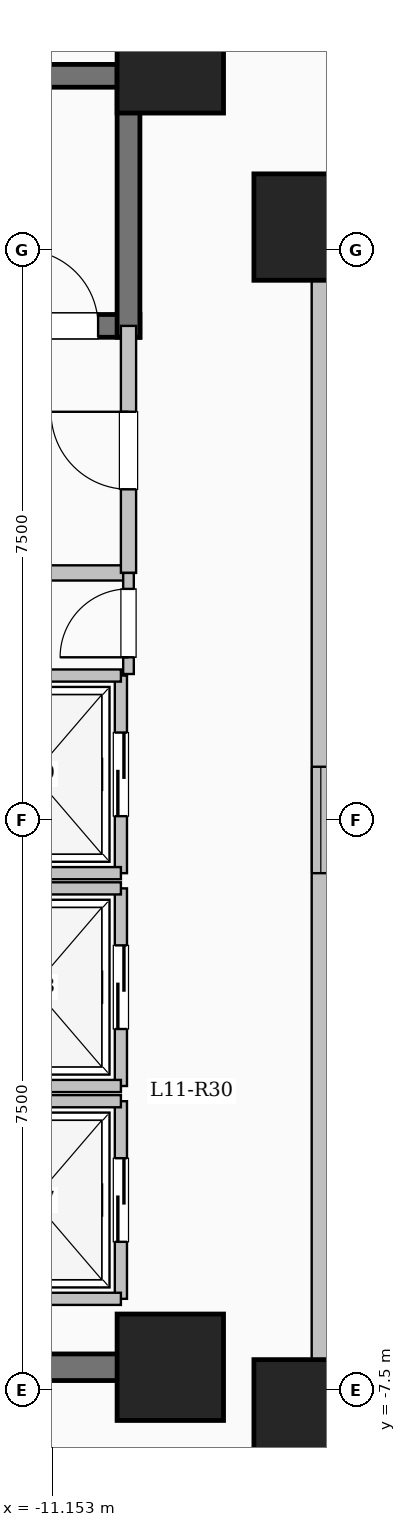
"""IFC4 building model, lengths in metres.
Left out: names, types, materials, properties, quantities, classifications, styles, units other than length and angle.
Written with IfcOpenShell. Run it as: python <this file> out.ifc"""

import sys

from ifc_helpers import new_model, si_unit, direction, frame, frame_2d, origin, origin_2d, place, context, subcontext, project, spatial, rectangle, extrude, element, fill, save


model = new_model("IFC4")
c1 = context("Model", 3, precision=1e-05, world=origin(), true_north=direction((0.0, 1.0)))
c2 = subcontext(c1, "Body", "Model", "MODEL_VIEW")
j1 = project(units=[si_unit("LENGTHUNIT", "METRE"), si_unit("PLANEANGLEUNIT", "RADIAN")], contexts=[c1])
p1 = place(None, origin())
s1 = spatial("IfcSite", under=j1, at=p1, CompositionType="ELEMENT")
p2 = place(p1, origin())
s2 = spatial("IfcBuilding", under=s1, at=p2, CompositionType="ELEMENT")
p3 = place(p2, frame((0.0, 0.0, 44.1)))
s3 = spatial("IfcBuildingStorey", under=s2, at=p3, CompositionType="ELEMENT", Elevation=44.1)
for number, where, z_axis, x_axis in (
    (1, (-7.8, -7.8, 0.0), (0.0, 0.0, 1.0), (1.0, 0.0, 0.0)),
    (2, (-7.8, 7.8, 0.0), (0.0, 0.0, 1.0), (1.0, 0.0, 0.0)),
    (3, (-9.6, -7.2, 0.0), (0.0, 0.0, 1.0), (1.0, 0.0, 0.0)),
    (4, (-9.6, 10.0, 0.0), (0.0, 0.0, 1.0), (1.0, 0.0, 0.0)),
):
    element("IfcColumn", number, at=place(p3, frame(where, z_axis=z_axis, x_axis=x_axis)), inside=s3, PredefinedType="COLUMN", context=c2, shape_type="SweptSolid", body=[
        extrude(rectangle(XDim=1.4, YDim=1.4, at=origin_2d()), origin(), (0.0, 0.0, 1.0), 3.35),
    ])
p4 = place(p3, frame((-7.62, -7.62, 0.0), z_axis=(0.0, 0.0, 1.0), x_axis=(1.0, 0.0, 0.0)))
e5 = element("IfcWall", 5, at=p4, inside=s3, PredefinedType="SOLIDWALL", context=c2, shape_type="SweptSolid", body=[
    extrude(rectangle(XDim=15.24, YDim=0.24, at=frame_2d((7.62, 0.0))), origin(), (0.0, 0.0, 1.0), 3.1),
])
p5 = place(p4, frame((6.92, 0.0, 0.95)))
e6 = element("IfcOpeningElement", 6, at=p5, cuts=e5, PredefinedType="OPENING", context=c2, shape_type="SweptSolid", body=[
    extrude(rectangle(XDim=1.4, YDim=1.5, at=frame_2d((0.7, 0.75))), frame((0.0, 0.13, 0.0), z_axis=(0.0, -1.0, 0.0), x_axis=(1.0, 0.0, 0.0)), (0.0, 0.0, 1.0), 0.26),
])
p6 = place(p3, frame((7.62, 7.62, 0.0), z_axis=(0.0, 0.0, 1.0), x_axis=(-1.0, 0.0, 0.0)))
e7 = element("IfcWall", 7, at=p6, inside=s3, PredefinedType="SOLIDWALL", context=c2, shape_type="SweptSolid", body=[
    extrude(rectangle(XDim=15.24, YDim=0.24, at=frame_2d((7.62, 0.0))), origin(), (0.0, 0.0, 1.0), 3.1),
])
p7 = place(p6, frame((6.92, 0.0, 0.95)))
e8 = element("IfcOpeningElement", 8, at=p7, cuts=e7, PredefinedType="OPENING", context=c2, shape_type="SweptSolid", body=[
    extrude(rectangle(XDim=1.4, YDim=1.5, at=frame_2d((0.7, 0.75))), frame((0.0, 0.13, 0.0), z_axis=(0.0, -1.0, 0.0), x_axis=(1.0, 0.0, 0.0)), (0.0, 0.0, 1.0), 0.26),
])
p8 = place(p3, frame((-7.62, 7.62, 0.0), z_axis=(0.0, 0.0, 1.0), x_axis=(0.0, -1.0, 0.0)))
e9 = element("IfcWall", 9, at=p8, inside=s3, PredefinedType="SOLIDWALL", context=c2, shape_type="SweptSolid", body=[
    extrude(rectangle(XDim=15.24, YDim=0.24, at=frame_2d((7.62, 0.0))), origin(), (0.0, 0.0, 1.0), 3.1),
])
p9 = place(p8, frame((6.92, 0.0, 0.95)))
e10 = element("IfcOpeningElement", 10, at=p9, cuts=e9, PredefinedType="OPENING", context=c2, shape_type="SweptSolid", body=[
    extrude(rectangle(XDim=1.4, YDim=1.5, at=frame_2d((0.7, 0.75))), frame((0.0, 0.13, 0.0), z_axis=(0.0, -1.0, 0.0), x_axis=(1.0, 0.0, 0.0)), (0.0, 0.0, 1.0), 0.26),
])
p10 = place(p3, frame((-18.0, 9.79, 0.0), z_axis=(0.0, 0.0, 1.0), x_axis=(1.0, 0.0, 0.0)))
e11 = element("IfcWall", 11, at=p10, inside=s3, PredefinedType="SHEAR", context=c2, shape_type="SweptSolid", body=[
    extrude(rectangle(XDim=8.0, YDim=0.3, at=frame_2d((4.0, 0.0))), origin(), (0.0, 0.0, 1.0), 3.35),
])
p11 = place(p3, frame((-18.0, 6.5, 0.0), z_axis=(0.0, 0.0, 1.0), x_axis=(1.0, 0.0, 0.0)))
e12 = element("IfcWall", 12, at=p11, inside=s3, PredefinedType="SHEAR", context=c2, shape_type="SweptSolid", body=[
    extrude(rectangle(XDim=8.0, YDim=0.3, at=frame_2d((4.0, 0.0))), origin(), (0.0, 0.0, 1.0), 3.35),
])
p12 = place(p11, frame((6.45, 0.0, 0.0)))
e13 = element("IfcOpeningElement", 13, at=p12, cuts=e12, PredefinedType="OPENING", context=c2, shape_type="SweptSolid", body=[
    extrude(rectangle(XDim=1.0, YDim=2.15, at=frame_2d((0.5, 1.075))), frame((0.0, 0.16, 0.0), z_axis=(0.0, -1.0, 0.0), x_axis=(1.0, 0.0, 0.0)), (0.0, 0.0, 1.0), 0.32),
])
p13 = place(p3, frame((-10.15, 6.35, 0.0), z_axis=(0.0, 0.0, 1.0), x_axis=(0.0, 1.0, 0.0)))
e14 = element("IfcWall", 14, at=p13, inside=s3, PredefinedType="SHEAR", context=c2, shape_type="SweptSolid", body=[
    extrude(rectangle(XDim=3.59, YDim=0.3, at=frame_2d((1.795, 0.0))), origin(), (0.0, 0.0, 1.0), 3.35),
])
p14 = place(p3, frame((-15.55, 3.25, 0.0), z_axis=(0.0, 0.0, 1.0), x_axis=(1.0, 0.0, 0.0)))
e15 = element("IfcWall", 15, at=p14, inside=s3, PredefinedType="SOLIDWALL", context=c2, shape_type="SweptSolid", body=[
    extrude(rectangle(XDim=5.4, YDim=0.2, at=frame_2d((2.7, 0.0))), origin(), (0.0, 0.0, 1.0), 3.1),
])
p15 = place(p3, frame((-10.15, 3.25, 0.0), z_axis=(0.0, 0.0, 1.0), x_axis=(0.0, 1.0, 0.0)))
e16 = element("IfcWall", 16, at=p15, inside=s3, PredefinedType="SOLIDWALL", context=c2, shape_type="SweptSolid", body=[
    extrude(rectangle(XDim=3.25, YDim=0.2, at=frame_2d((1.625, 0.0))), origin(), (0.0, 0.0, 1.0), 3.1),
])
p16 = place(p15, frame((1.1, 0.0, 0.0)))
e17 = element("IfcOpeningElement", 17, at=p16, cuts=e16, PredefinedType="OPENING", context=c2, shape_type="SweptSolid", body=[
    extrude(rectangle(XDim=1.02, YDim=2.15, at=frame_2d((0.51, 1.075))), frame((0.0, 0.11, 0.0), z_axis=(0.0, -1.0, 0.0), x_axis=(1.0, 0.0, 0.0)), (0.0, 0.0, 1.0), 0.22),
])
p17 = place(p3, frame((-10.25, -6.3, 0.0), z_axis=(0.0, 0.0, 1.0), x_axis=(0.0, 1.0, 0.0)))
e18 = element("IfcWall", 18, at=p17, inside=s3, PredefinedType="SOLIDWALL", context=c2, shape_type="SweptSolid", body=[
    extrude(rectangle(XDim=2.6, YDim=0.16, at=frame_2d((1.3, 0.0))), origin(), (0.0, 0.0, 1.0), 3.1),
])
p18 = place(p17, frame((0.75, 0.0, 0.0)))
e19 = element("IfcOpeningElement", 19, at=p18, cuts=e18, PredefinedType="OPENING", context=c2, shape_type="SweptSolid", body=[
    extrude(rectangle(XDim=1.1, YDim=2.15, at=frame_2d((0.55, 1.075))), frame((0.0, 0.09, 0.0), z_axis=(0.0, -1.0, 0.0), x_axis=(1.0, 0.0, 0.0)), (0.0, 0.0, 1.0), 0.18),
])
for number, where, z_axis, x_axis in (
    (20, (-12.55, -6.3, 0.0), (0.0, 0.0, 1.0), (1.0, 0.0, 0.0)),
    (21, (-12.55, -3.7, 0.0), (0.0, 0.0, 1.0), (1.0, 0.0, 0.0)),
):
    element("IfcWall", number, at=place(p3, frame(where, z_axis=z_axis, x_axis=x_axis)), inside=s3, PredefinedType="SOLIDWALL", context=c2, shape_type="SweptSolid", body=[
        extrude(rectangle(XDim=2.3, YDim=0.16, at=frame_2d((1.15, 0.0))), origin(), (0.0, 0.0, 1.0), 3.1),
    ])
p19 = place(p3, frame((-10.25, -3.5, 0.0), z_axis=(0.0, 0.0, 1.0), x_axis=(0.0, 1.0, 0.0)))
e22 = element("IfcWall", 22, at=p19, inside=s3, PredefinedType="SOLIDWALL", context=c2, shape_type="SweptSolid", body=[
    extrude(rectangle(XDim=2.6, YDim=0.16, at=frame_2d((1.3, 0.0))), origin(), (0.0, 0.0, 1.0), 3.1),
])
p20 = place(p19, frame((0.75, 0.0, 0.0)))
e23 = element("IfcOpeningElement", 23, at=p20, cuts=e22, PredefinedType="OPENING", context=c2, shape_type="SweptSolid", body=[
    extrude(rectangle(XDim=1.1, YDim=2.15, at=frame_2d((0.55, 1.075))), frame((0.0, 0.09, 0.0), z_axis=(0.0, -1.0, 0.0), x_axis=(1.0, 0.0, 0.0)), (0.0, 0.0, 1.0), 0.18),
])
for number, where, z_axis, x_axis in (
    (24, (-12.55, -3.5, 0.0), (0.0, 0.0, 1.0), (1.0, 0.0, 0.0)),
    (25, (-12.55, -0.9, 0.0), (0.0, 0.0, 1.0), (1.0, 0.0, 0.0)),
):
    element("IfcWall", number, at=place(p3, frame(where, z_axis=z_axis, x_axis=x_axis)), inside=s3, PredefinedType="SOLIDWALL", context=c2, shape_type="SweptSolid", body=[
        extrude(rectangle(XDim=2.3, YDim=0.16, at=frame_2d((1.15, 0.0))), origin(), (0.0, 0.0, 1.0), 3.1),
    ])
p21 = place(p3, frame((-10.25, -0.7, 0.0), z_axis=(0.0, 0.0, 1.0), x_axis=(0.0, 1.0, 0.0)))
e26 = element("IfcWall", 26, at=p21, inside=s3, PredefinedType="SOLIDWALL", context=c2, shape_type="SweptSolid", body=[
    extrude(rectangle(XDim=2.6, YDim=0.16, at=frame_2d((1.3, 0.0))), origin(), (0.0, 0.0, 1.0), 3.1),
])
p22 = place(p21, frame((0.75, 0.0, 0.0)))
e27 = element("IfcOpeningElement", 27, at=p22, cuts=e26, PredefinedType="OPENING", context=c2, shape_type="SweptSolid", body=[
    extrude(rectangle(XDim=1.1, YDim=2.15, at=frame_2d((0.55, 1.075))), frame((0.0, 0.09, 0.0), z_axis=(0.0, -1.0, 0.0), x_axis=(1.0, 0.0, 0.0)), (0.0, 0.0, 1.0), 0.18),
])
for number, where, z_axis, x_axis in (
    (28, (-12.55, -0.7, 0.0), (0.0, 0.0, 1.0), (1.0, 0.0, 0.0)),
    (29, (-12.55, 1.9, 0.0), (0.0, 0.0, 1.0), (1.0, 0.0, 0.0)),
):
    element("IfcWall", number, at=place(p3, frame(where, z_axis=z_axis, x_axis=x_axis)), inside=s3, PredefinedType="SOLIDWALL", context=c2, shape_type="SweptSolid", body=[
        extrude(rectangle(XDim=2.3, YDim=0.16, at=frame_2d((1.15, 0.0))), origin(), (0.0, 0.0, 1.0), 3.1),
    ])
p23 = place(p3, frame((-18.625, -7.2, 0.0), z_axis=(0.0, 0.0, 1.0), x_axis=(1.0, 0.0, 0.0)))
e30 = element("IfcWall", 30, at=p23, inside=s3, PredefinedType="SHEAR", context=c2, shape_type="SweptSolid", body=[
    extrude(rectangle(XDim=8.55, YDim=0.35, at=frame_2d((4.275, 0.0))), origin(), (0.0, 0.0, 1.0), 3.35),
])
p24 = place(p3, frame((-10.15, 1.92, 0.0), z_axis=(0.0, 0.0, 1.0), x_axis=(0.0, 1.0, 0.0)))
e31 = element("IfcWall", 31, at=p24, inside=s3, PredefinedType="PARTITIONING", context=c2, shape_type="SweptSolid", body=[
    extrude(rectangle(XDim=1.33, YDim=0.14, at=frame_2d((0.665, 0.0))), origin(), (0.0, 0.0, 1.0), 3.1),
])
p25 = place(p24, frame((0.22, 0.0, 0.0)))
e32 = element("IfcOpeningElement", 32, at=p25, cuts=e31, PredefinedType="OPENING", context=c2, shape_type="SweptSolid", body=[
    extrude(rectangle(XDim=0.9, YDim=2.08, at=frame_2d((0.45, 1.04))), frame((0.0, 0.08, 0.0), z_axis=(0.0, -1.0, 0.0), x_axis=(1.0, 0.0, 0.0)), (0.0, 0.0, 1.0), 0.16),
])
p26 = place(p9, origin())
e33 = element("IfcWindow", 33, at=p26, inside=s3, PartitioningType="SINGLE_PANEL", PredefinedType="WINDOW", context=c2, shape_type="SweptSolid", body=[
    extrude(rectangle(XDim=1.4, YDim=1.5, at=frame_2d((0.7, 0.75))), frame((0.0, 0.03, 0.0), z_axis=(0.0, -1.0, 0.0), x_axis=(1.0, 0.0, 0.0)), (0.0, 0.0, 1.0), 0.06),
])
fill(e10, e33)
p27 = place(p12, origin())
e34 = element("IfcDoor", 34, at=p27, inside=s3, OperationType="SINGLE_SWING_LEFT", PredefinedType="DOOR", context=c2, shape_type="SweptSolid", body=[
    extrude(rectangle(XDim=1.0, YDim=2.15, at=frame_2d((0.5, 1.075))), frame((0.0, 0.025, 0.0), z_axis=(0.0, -1.0, 0.0), x_axis=(1.0, 0.0, 0.0)), (0.0, 0.0, 1.0), 0.05),
])
fill(e13, e34)
p28 = place(p16, origin())
e35 = element("IfcDoor", 35, at=p28, inside=s3, OperationType="SINGLE_SWING_RIGHT", PredefinedType="DOOR", context=c2, shape_type="SweptSolid", body=[
    extrude(rectangle(XDim=1.02, YDim=2.15, at=frame_2d((0.51, 1.075))), frame((0.0, 0.025, 0.0), z_axis=(0.0, -1.0, 0.0), x_axis=(1.0, 0.0, 0.0)), (0.0, 0.0, 1.0), 0.05),
])
fill(e17, e35)
p29 = place(p18, origin())
e36 = element("IfcDoor", 36, at=p29, inside=s3, OperationType="SLIDING_TO_LEFT", PredefinedType="DOOR", context=c2, shape_type="SweptSolid", body=[
    extrude(rectangle(XDim=1.1, YDim=2.15, at=frame_2d((0.55, 1.075))), frame((0.0, 0.025, 0.0), z_axis=(0.0, -1.0, 0.0), x_axis=(1.0, 0.0, 0.0)), (0.0, 0.0, 1.0), 0.05),
])
fill(e19, e36)
p30 = place(p20, origin())
e37 = element("IfcDoor", 37, at=p30, inside=s3, OperationType="SLIDING_TO_LEFT", PredefinedType="DOOR", context=c2, shape_type="SweptSolid", body=[
    extrude(rectangle(XDim=1.1, YDim=2.15, at=frame_2d((0.55, 1.075))), frame((0.0, 0.025, 0.0), z_axis=(0.0, -1.0, 0.0), x_axis=(1.0, 0.0, 0.0)), (0.0, 0.0, 1.0), 0.05),
])
fill(e23, e37)
p31 = place(p22, origin())
e38 = element("IfcDoor", 38, at=p31, inside=s3, OperationType="SLIDING_TO_LEFT", PredefinedType="DOOR", context=c2, shape_type="SweptSolid", body=[
    extrude(rectangle(XDim=1.1, YDim=2.15, at=frame_2d((0.55, 1.075))), frame((0.0, 0.025, 0.0), z_axis=(0.0, -1.0, 0.0), x_axis=(1.0, 0.0, 0.0)), (0.0, 0.0, 1.0), 0.05),
])
fill(e27, e38)
p32 = place(p25, origin())
e39 = element("IfcDoor", 39, at=p32, inside=s3, OperationType="SINGLE_SWING_LEFT", PredefinedType="DOOR", context=c2, shape_type="SweptSolid", body=[
    extrude(rectangle(XDim=0.9, YDim=2.08, at=frame_2d((0.45, 1.04))), frame((0.0, 0.025, 0.0), z_axis=(0.0, -1.0, 0.0), x_axis=(1.0, 0.0, 0.0)), (0.0, 0.0, 1.0), 0.05),
])
fill(e32, e39)
save(model, sys.argv[1])
